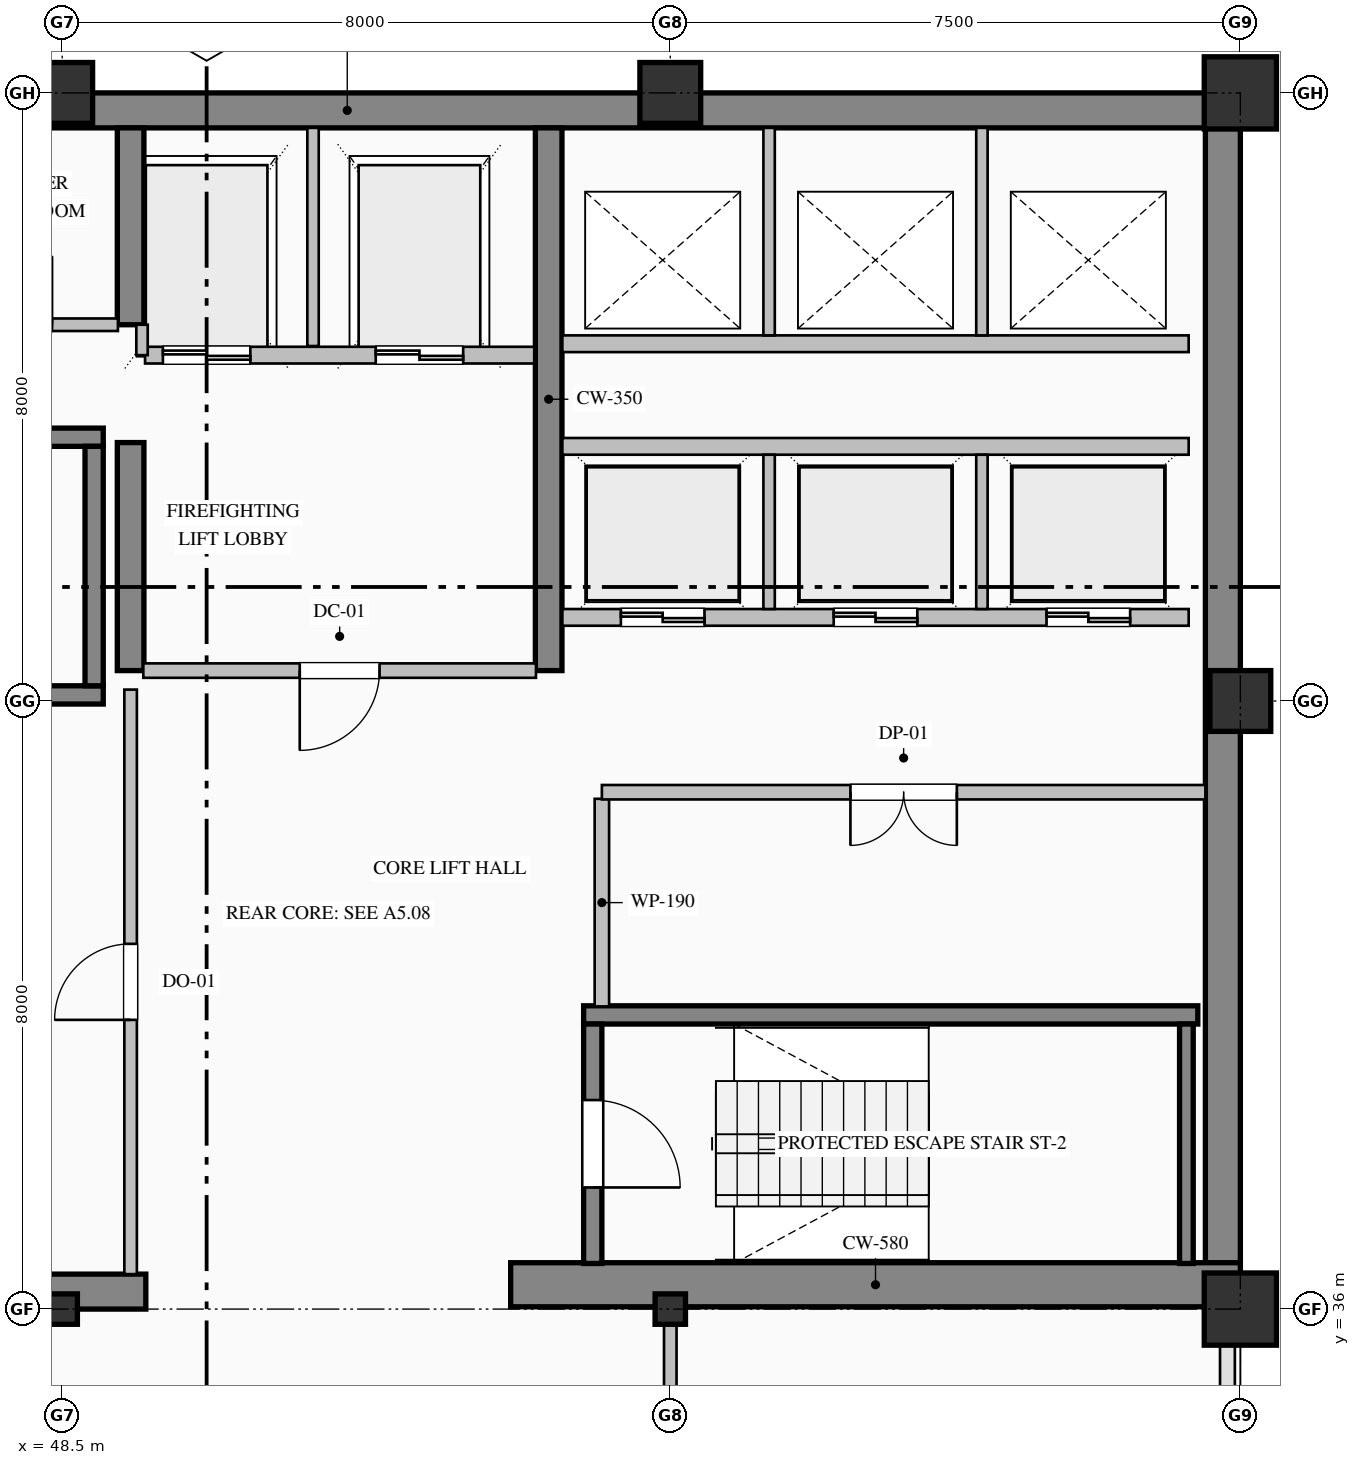
"""IFC4 building model, lengths in metres.
Left out: names, types, materials, properties, quantities, classifications, styles, units other than length and angle.
Written with IfcOpenShell. Run it as: python <this file> out.ifc"""

import sys

from ifc_helpers import new_model, si_unit, direction, frame, frame_2d, origin, origin_2d, place, context, subcontext, project, spatial, rectangle, hollow_rectangle, i_section, extrude, element, fill, save


model = new_model("IFC4")
c1 = context("Model", 3, precision=1e-05, world=origin(), true_north=direction((0.0, 1.0)))
c2 = subcontext(c1, "Body", "Model", "MODEL_VIEW")
j1 = project(units=[si_unit("LENGTHUNIT", "METRE"), si_unit("PLANEANGLEUNIT", "RADIAN")], contexts=[c1])
p1 = place(None, origin())
s1 = spatial("IfcSite", under=j1, at=p1, CompositionType="ELEMENT")
p2 = place(p1, origin())
s2 = spatial("IfcBuilding", under=s1, at=p2, CompositionType="ELEMENT")
p3 = place(p2, frame((0.0, 0.0, 205.8)))
s3 = spatial("IfcBuildingStorey", under=s2, at=p3, CompositionType="ELEMENT", Elevation=205.8)
p4 = place(p3, frame((40.5, 51.77, 0.0), z_axis=(0.0, 0.0, 1.0), x_axis=(1.0, 0.0, 0.0)))
e1 = element("IfcWall", 1, at=p4, inside=s3, PredefinedType="SHEAR", context=c2, shape_type="SweptSolid", body=[
    extrude(rectangle(XDim=23.5, YDim=0.46, at=frame_2d((11.75, 0.0))), origin(), (0.0, 0.0, 1.0), 3.775),
])
p5 = place(p3, frame((63.77, 36.32, 0.0), z_axis=(0.0, 0.0, 1.0), x_axis=(0.0, 1.0, 0.0)))
e2 = element("IfcWall", 2, at=p5, inside=s3, PredefinedType="SHEAR", context=c2, shape_type="SweptSolid", body=[
    extrude(rectangle(XDim=15.22, YDim=0.46, at=frame_2d((7.61, 0.0))), origin(), (0.0, 0.0, 1.0), 3.775),
])
p6 = place(p3, frame((40.5, 36.23, 0.0), z_axis=(0.0, 0.0, 1.0), x_axis=(1.0, 0.0, 0.0)))
e3 = element("IfcWall", 3, at=p6, inside=s3, PredefinedType="SHEAR", context=c2, shape_type="SweptSolid", body=[
    extrude(rectangle(XDim=9.1, YDim=0.46, at=frame_2d((4.55, 0.0))), origin(), (0.0, 0.0, 1.0), 3.775),
])
p7 = place(p3, frame((54.4, 36.32, 0.0), z_axis=(0.0, 0.0, 1.0), x_axis=(1.0, 0.0, 0.0)))
e4 = element("IfcWall", 4, at=p7, inside=s3, PredefinedType="SHEAR", context=c2, shape_type="SweptSolid", body=[
    extrude(rectangle(XDim=9.6, YDim=0.58, at=frame_2d((4.8, 0.0))), origin(), (0.0, 0.0, 1.0), 4.0),
])
p8 = place(p3, frame((49.4, 44.4, 0.0), z_axis=(0.0, 0.0, 1.0), x_axis=(0.0, 1.0, 0.0)))
e5 = element("IfcWall", 5, at=p8, inside=s3, PredefinedType="SHEAR", context=c2, shape_type="SweptSolid", body=[
    extrude(rectangle(XDim=3.0, YDim=0.35, at=frame_2d((1.5, 0.0))), origin(), (0.0, 0.0, 1.0), 3.775),
])
p9 = place(p3, frame((49.4, 48.95, 0.0), z_axis=(0.0, 0.0, 1.0), x_axis=(0.0, 1.0, 0.0)))
e6 = element("IfcWall", 6, at=p9, inside=s3, PredefinedType="SHEAR", context=c2, shape_type="SweptSolid", body=[
    extrude(rectangle(XDim=2.59, YDim=0.35, at=frame_2d((1.295, 0.0))), origin(), (0.0, 0.0, 1.0), 3.775),
])
p10 = place(p3, frame((54.9, 44.4, 0.0), z_axis=(0.0, 0.0, 1.0), x_axis=(0.0, 1.0, 0.0)))
e7 = element("IfcWall", 7, at=p10, inside=s3, PredefinedType="SHEAR", context=c2, shape_type="SweptSolid", body=[
    extrude(rectangle(XDim=7.14, YDim=0.35, at=frame_2d((3.57, 0.0))), origin(), (0.0, 0.0, 1.0), 3.775),
])
p11 = place(p3, frame((48.5, 36.0, 0.0), z_axis=(0.0, 0.0, 1.0), x_axis=(1.0, 0.0, 0.0)))
e8 = element("IfcColumn", 8, at=p11, inside=s3, PredefinedType="COLUMN", context=c2, shape_type="SweptSolid", body=[
    extrude(i_section(OverallWidth=0.4, OverallDepth=0.4, WebThickness=0.013, FlangeThickness=0.021, FilletRadius=0.022, at=origin_2d()), origin(), (0.0, 0.0, 1.0), 4.0),
])
p12 = place(p3, frame((48.5, 52.0, 0.0), z_axis=(0.0, 0.0, 1.0), x_axis=(1.0, 0.0, 0.0)))
e9 = element("IfcColumn", 9, at=p12, inside=s3, PredefinedType="COLUMN", context=c2, shape_type="SweptSolid", body=[
    extrude(hollow_rectangle(XDim=0.8, YDim=0.8, WallThickness=0.032, at=origin_2d()), origin(), (0.0, 0.0, 1.0), 4.0),
])
p13 = place(p3, frame((56.5, 36.0, 0.0), z_axis=(0.0, 0.0, 1.0), x_axis=(1.0, 0.0, 0.0)))
e10 = element("IfcColumn", 10, at=p13, inside=s3, PredefinedType="COLUMN", context=c2, shape_type="SweptSolid", body=[
    extrude(i_section(OverallWidth=0.4, OverallDepth=0.4, WebThickness=0.013, FlangeThickness=0.021, FilletRadius=0.022, at=origin_2d()), origin(), (0.0, 0.0, 1.0), 4.0),
])
p14 = place(p3, frame((56.5, 52.0, 0.0), z_axis=(0.0, 0.0, 1.0), x_axis=(1.0, 0.0, 0.0)))
e11 = element("IfcColumn", 11, at=p14, inside=s3, PredefinedType="COLUMN", context=c2, shape_type="SweptSolid", body=[
    extrude(hollow_rectangle(XDim=0.8, YDim=0.8, WallThickness=0.032, at=origin_2d()), origin(), (0.0, 0.0, 1.0), 4.0),
])
p15 = place(p3, frame((64.0, 36.0, 0.0), z_axis=(0.0, 0.0, 1.0), x_axis=(1.0, 0.0, 0.0)))
e12 = element("IfcColumn", 12, at=p15, inside=s3, PredefinedType="COLUMN", context=c2, shape_type="SweptSolid", body=[
    extrude(hollow_rectangle(XDim=0.95, YDim=0.95, WallThickness=0.036, at=origin_2d()), origin(), (0.0, 0.0, 1.0), 4.0),
])
p16 = place(p3, frame((64.0, 44.0, 0.0), z_axis=(0.0, 0.0, 1.0), x_axis=(1.0, 0.0, 0.0)))
e13 = element("IfcColumn", 13, at=p16, inside=s3, PredefinedType="COLUMN", context=c2, shape_type="SweptSolid", body=[
    extrude(hollow_rectangle(XDim=0.8, YDim=0.8, WallThickness=0.032, at=origin_2d()), origin(), (0.0, 0.0, 1.0), 4.0),
])
p17 = place(p3, frame((64.0, 52.0, 0.0), z_axis=(0.0, 0.0, 1.0), x_axis=(1.0, 0.0, 0.0)))
e14 = element("IfcColumn", 14, at=p17, inside=s3, PredefinedType="COLUMN", context=c2, shape_type="SweptSolid", body=[
    extrude(hollow_rectangle(XDim=0.95, YDim=0.95, WallThickness=0.036, at=origin_2d()), origin(), (0.0, 0.0, 1.0), 4.0),
])
for number, where, z_axis, x_axis in (
    (15, (40.96, 47.47, 0.0), (0.0, 0.0, 1.0), (1.0, 0.0, 0.0)),
    (16, (49.04, 44.08, 0.0), (0.0, 0.0, 1.0), (-1.0, 0.0, 0.0)),
):
    element("IfcWall", number, at=place(p3, frame(where, z_axis=z_axis, x_axis=x_axis)), inside=s3, PredefinedType="SOLIDWALL", context=c2, shape_type="SweptSolid", body=[
        extrude(rectangle(XDim=8.08, YDim=0.24, at=frame_2d((4.04, 0.0))), origin(), (0.0, 0.0, 1.0), 4.0),
    ])
p18 = place(p3, frame((48.92, 44.2, 0.0), z_axis=(0.0, 0.0, 1.0), x_axis=(0.0, 1.0, 0.0)))
e17 = element("IfcWall", 17, at=p18, inside=s3, PredefinedType="SOLIDWALL", context=c2, shape_type="SweptSolid", body=[
    extrude(rectangle(XDim=3.15, YDim=0.24, at=frame_2d((1.575, 0.0))), origin(), (0.0, 0.0, 1.0), 4.0),
])
p19 = place(p3, frame((55.36, 39.87, 0.0), z_axis=(0.0, 0.0, 1.0), x_axis=(1.0, 0.0, 0.0)))
e18 = element("IfcWall", 18, at=p19, inside=s3, PredefinedType="SOLIDWALL", context=c2, shape_type="SweptSolid", body=[
    extrude(rectangle(XDim=8.08, YDim=0.24, at=frame_2d((4.04, 0.0))), origin(), (0.0, 0.0, 1.0), 4.0),
])
p20 = place(p3, frame((55.48, 39.75, 0.0), z_axis=(0.0, 0.0, 1.0), x_axis=(0.0, -1.0, 0.0)))
e19 = element("IfcWall", 19, at=p20, inside=s3, PredefinedType="SOLIDWALL", context=c2, shape_type="SweptSolid", body=[
    extrude(rectangle(XDim=3.15, YDim=0.24, at=frame_2d((1.575, 0.0))), origin(), (0.0, 0.0, 1.0), 4.0),
])
p21 = place(p20, frame((1.0, 0.0, 0.0)))
e20 = element("IfcOpeningElement", 20, at=p21, cuts=e19, PredefinedType="OPENING", context=c2, shape_type="SweptSolid", body=[
    extrude(rectangle(XDim=1.15, YDim=2.2, at=frame_2d((0.575, 1.1))), frame((0.0, 0.13, 0.0), z_axis=(0.0, -1.0, 0.0), x_axis=(1.0, 0.0, 0.0)), (0.0, 0.0, 1.0), 0.26),
])
p22 = place(p3, frame((63.29, 36.6, 0.0), z_axis=(0.0, 0.0, 1.0), x_axis=(0.0, 1.0, 0.0)))
e21 = element("IfcWall", 21, at=p22, inside=s3, PredefinedType="SOLIDWALL", context=c2, shape_type="SweptSolid", body=[
    extrude(rectangle(XDim=3.15, YDim=0.18, at=frame_2d((1.575, 0.0))), origin(), (0.0, 0.0, 1.0), 4.0),
])
p23 = place(p3, frame((54.71, 48.55, 0.0), z_axis=(0.0, 0.0, 1.0), x_axis=(-1.0, 0.0, 0.0)))
e22 = element("IfcWall", 22, at=p23, inside=s3, PredefinedType="PARTITIONING", context=c2, shape_type="SweptSolid", body=[
    extrude(rectangle(XDim=5.12, YDim=0.22, at=frame_2d((2.56, 0.0))), origin(), (0.0, 0.0, 1.0), 3.775),
])
p24 = place(p23, frame((3.735, 0.0, 0.0)))
e23 = element("IfcOpeningElement", 23, at=p24, cuts=e22, PredefinedType="OPENING", context=c2, shape_type="SweptSolid", body=[
    extrude(rectangle(XDim=1.15, YDim=2.2, at=frame_2d((0.575, 1.1))), frame((0.0, 0.12, 0.0), z_axis=(0.0, -1.0, 0.0), x_axis=(1.0, 0.0, 0.0)), (0.0, 0.0, 1.0), 0.24),
])
p25 = place(p23, frame((0.935, 0.0, 0.0)))
e24 = element("IfcOpeningElement", 24, at=p25, cuts=e22, PredefinedType="OPENING", context=c2, shape_type="SweptSolid", body=[
    extrude(rectangle(XDim=1.15, YDim=2.2, at=frame_2d((0.575, 1.1))), frame((0.0, 0.12, 0.0), z_axis=(0.0, -1.0, 0.0), x_axis=(1.0, 0.0, 0.0)), (0.0, 0.0, 1.0), 0.24),
])
p26 = place(p3, frame((51.8, 48.67, 0.0), z_axis=(0.0, 0.0, 1.0), x_axis=(0.0, 1.0, 0.0)))
e25 = element("IfcWall", 25, at=p26, inside=s3, PredefinedType="PARTITIONING", context=c2, shape_type="SweptSolid", body=[
    extrude(rectangle(XDim=2.87, YDim=0.15, at=frame_2d((1.435, 0.0))), origin(), (0.0, 0.0, 1.0), 3.775),
])
p27 = place(p3, frame((49.55, 48.55, 0.0), z_axis=(0.0, 0.0, 1.0), x_axis=(0.0, 1.0, 0.0)))
e26 = element("IfcWall", 26, at=p27, inside=s3, PredefinedType="PARTITIONING", context=c2, shape_type="SweptSolid", body=[
    extrude(rectangle(XDim=0.4, YDim=0.15, at=frame_2d((0.2, 0.0))), origin(), (0.0, 0.0, 1.0), 3.775),
])
p28 = place(p3, frame((63.32, 45.1, 0.0), z_axis=(0.0, 0.0, 1.0), x_axis=(-1.0, 0.0, 0.0)))
e27 = element("IfcWall", 27, at=p28, inside=s3, PredefinedType="PARTITIONING", context=c2, shape_type="SweptSolid", body=[
    extrude(rectangle(XDim=8.24, YDim=0.22, at=frame_2d((4.12, 0.0))), origin(), (0.0, 0.0, 1.0), 3.775),
])
p29 = place(p28, frame((6.37, 0.0, 0.0)))
e28 = element("IfcOpeningElement", 28, at=p29, cuts=e27, PredefinedType="OPENING", context=c2, shape_type="SweptSolid", body=[
    extrude(rectangle(XDim=1.1, YDim=2.2, at=frame_2d((0.55, 1.1))), frame((0.0, 0.12, 0.0), z_axis=(0.0, -1.0, 0.0), x_axis=(1.0, 0.0, 0.0)), (0.0, 0.0, 1.0), 0.24),
])
p30 = place(p28, frame((3.57, 0.0, 0.0)))
e29 = element("IfcOpeningElement", 29, at=p30, cuts=e27, PredefinedType="OPENING", context=c2, shape_type="SweptSolid", body=[
    extrude(rectangle(XDim=1.1, YDim=2.2, at=frame_2d((0.55, 1.1))), frame((0.0, 0.12, 0.0), z_axis=(0.0, -1.0, 0.0), x_axis=(1.0, 0.0, 0.0)), (0.0, 0.0, 1.0), 0.24),
])
p31 = place(p28, frame((0.77, 0.0, 0.0)))
e30 = element("IfcOpeningElement", 30, at=p31, cuts=e27, PredefinedType="OPENING", context=c2, shape_type="SweptSolid", body=[
    extrude(rectangle(XDim=1.1, YDim=2.2, at=frame_2d((0.55, 1.1))), frame((0.0, 0.12, 0.0), z_axis=(0.0, -1.0, 0.0), x_axis=(1.0, 0.0, 0.0)), (0.0, 0.0, 1.0), 0.24),
])
p32 = place(p3, frame((55.08, 47.35, 0.0), z_axis=(0.0, 0.0, 1.0), x_axis=(1.0, 0.0, 0.0)))
e31 = element("IfcWall", 31, at=p32, inside=s3, PredefinedType="PARTITIONING", context=c2, shape_type="SweptSolid", body=[
    extrude(rectangle(XDim=8.24, YDim=0.22, at=frame_2d((4.12, 0.0))), origin(), (0.0, 0.0, 1.0), 3.775),
])
for number, where, z_axis, x_axis in (
    (32, (57.8, 45.21, 0.0), (0.0, 0.0, 1.0), (0.0, 1.0, 0.0)),
    (33, (60.6, 45.21, 0.0), (0.0, 0.0, 1.0), (0.0, 1.0, 0.0)),
):
    element("IfcWall", number, at=place(p3, frame(where, z_axis=z_axis, x_axis=x_axis)), inside=s3, PredefinedType="PARTITIONING", context=c2, shape_type="SweptSolid", body=[
        extrude(rectangle(XDim=2.03, YDim=0.15, at=frame_2d((1.015, 0.0))), origin(), (0.0, 0.0, 1.0), 3.775),
    ])
p33 = place(p3, frame((63.32, 48.7, 0.0), z_axis=(0.0, 0.0, 1.0), x_axis=(-1.0, 0.0, 0.0)))
e34 = element("IfcWall", 34, at=p33, inside=s3, PredefinedType="PARTITIONING", context=c2, shape_type="SweptSolid", body=[
    extrude(rectangle(XDim=8.24, YDim=0.22, at=frame_2d((4.12, 0.0))), origin(), (0.0, 0.0, 1.0), 3.775),
])
for number, where, z_axis, x_axis in (
    (35, (57.8, 48.81, 0.0), (0.0, 0.0, 1.0), (0.0, 1.0, 0.0)),
    (36, (60.6, 48.81, 0.0), (0.0, 0.0, 1.0), (0.0, 1.0, 0.0)),
):
    element("IfcWall", number, at=place(p3, frame(where, z_axis=z_axis, x_axis=x_axis)), inside=s3, PredefinedType="PARTITIONING", context=c2, shape_type="SweptSolid", body=[
        extrude(rectangle(XDim=2.73, YDim=0.15, at=frame_2d((1.365, 0.0))), origin(), (0.0, 0.0, 1.0), 3.775),
    ])
p34 = place(p3, frame((46.6, 48.95, 0.0), z_axis=(0.0, 0.0, 1.0), x_axis=(1.0, 0.0, 0.0)))
e37 = element("IfcWall", 37, at=p34, inside=s3, PredefinedType="PARTITIONING", context=c2, shape_type="SweptSolid", body=[
    extrude(rectangle(XDim=2.633, YDim=0.165, at=frame_2d((1.316, 0.0))), origin(), (0.0, 0.0, 1.0), 3.775),
])
p35 = place(p34, frame((0.866, 0.0, 0.0)))
e38 = element("IfcOpeningElement", 38, at=p35, cuts=e37, PredefinedType="OPENING", context=c2, shape_type="SweptSolid", body=[
    extrude(rectangle(XDim=0.9, YDim=2.15, at=frame_2d((0.45, 1.075))), frame((0.0, 0.093, 0.0), z_axis=(0.0, -1.0, 0.0), x_axis=(1.0, 0.0, 0.0)), (0.0, 0.0, 1.0), 0.185),
])
p36 = place(p3, frame((54.733, 44.4, 0.0), z_axis=(0.0, 0.0, 1.0), x_axis=(-1.0, 0.0, 0.0)))
e39 = element("IfcWall", 39, at=p36, inside=s3, PredefinedType="PARTITIONING", context=c2, shape_type="SweptSolid", body=[
    extrude(rectangle(XDim=5.166, YDim=0.19, at=frame_2d((2.583, 0.0))), origin(), (0.0, 0.0, 1.0), 3.775),
])
p37 = place(p36, frame((2.058, 0.0, 0.0)))
e40 = element("IfcOpeningElement", 40, at=p37, cuts=e39, PredefinedType="OPENING", context=c2, shape_type="SweptSolid", body=[
    extrude(rectangle(XDim=1.05, YDim=2.15, at=frame_2d((0.525, 1.075))), frame((0.0, 0.105, 0.0), z_axis=(0.0, -1.0, 0.0), x_axis=(1.0, 0.0, 0.0)), (0.0, 0.0, 1.0), 0.21),
])
p38 = place(p3, frame((49.4, 36.46, 0.0), z_axis=(0.0, 0.0, 1.0), x_axis=(0.0, 1.0, 0.0)))
e41 = element("IfcWall", 41, at=p38, inside=s3, PredefinedType="PARTITIONING", context=c2, shape_type="SweptSolid", body=[
    extrude(rectangle(XDim=7.69, YDim=0.165, at=frame_2d((3.845, 0.0))), origin(), (0.0, 0.0, 1.0), 3.017),
])
p39 = place(p38, frame((3.345, 0.0, 0.0)))
e42 = element("IfcOpeningElement", 42, at=p39, cuts=e41, PredefinedType="OPENING", context=c2, shape_type="SweptSolid", body=[
    extrude(rectangle(XDim=1.0, YDim=2.15, at=frame_2d((0.5, 1.075))), frame((0.0, 0.093, 0.0), z_axis=(0.0, -1.0, 0.0), x_axis=(1.0, 0.0, 0.0)), (0.0, 0.0, 1.0), 0.185),
])
p40 = place(p3, frame((55.6, 42.713, 0.0), z_axis=(0.0, 0.0, 1.0), x_axis=(0.0, -1.0, 0.0)))
e43 = element("IfcWall", 43, at=p40, inside=s3, PredefinedType="PARTITIONING", context=c2, shape_type="SweptSolid", body=[
    extrude(rectangle(XDim=2.731, YDim=0.19, at=frame_2d((1.365, 0.0))), origin(), (0.0, 0.0, 1.0), 3.775),
])
p41 = place(p3, frame((63.54, 42.8, 0.0), z_axis=(0.0, 0.0, 1.0), x_axis=(-1.0, 0.0, 0.0)))
e44 = element("IfcWall", 44, at=p41, inside=s3, PredefinedType="PARTITIONING", context=c2, shape_type="SweptSolid", body=[
    extrude(rectangle(XDim=7.94, YDim=0.19, at=frame_2d((3.97, 0.0))), origin(), (0.0, 0.0, 1.0), 3.775),
])
p42 = place(p41, frame((3.27, 0.0, 0.0)))
e45 = element("IfcOpeningElement", 45, at=p42, cuts=e44, PredefinedType="OPENING", context=c2, shape_type="SweptSolid", body=[
    extrude(rectangle(XDim=1.4, YDim=2.25, at=frame_2d((0.7, 1.125))), frame((0.0, 0.105, 0.0), z_axis=(0.0, -1.0, 0.0), x_axis=(1.0, 0.0, 0.0)), (0.0, 0.0, 1.0), 0.21),
])
p43 = place(p3, frame((56.5, 36.0, 0.0), z_axis=(0.0, 0.0, 1.0), x_axis=(0.0, -1.0, 0.0)))
e46 = element("IfcWall", 46, at=p43, inside=s3, PredefinedType="PARTITIONING", context=c2, shape_type="SweptSolid", body=[
    extrude(rectangle(XDim=4.153, YDim=0.165, at=frame_2d((2.077, 0.0))), origin(), (0.0, 0.0, 1.0), 3.179),
])
p44 = place(p43, frame((1.576, 0.0, 0.0)))
e47 = element("IfcOpeningElement", 47, at=p44, cuts=e46, PredefinedType="OPENING", context=c2, shape_type="SweptSolid", body=[
    extrude(rectangle(XDim=1.0, YDim=2.15, at=frame_2d((0.5, 1.075))), frame((0.0, 0.093, 0.0), z_axis=(0.0, -1.0, 0.0), x_axis=(1.0, 0.0, 0.0)), (0.0, 0.0, 1.0), 0.185),
])
p45 = place(p21, origin())
e48 = element("IfcDoor", 48, at=p45, inside=s3, OperationType="SINGLE_SWING_RIGHT", PredefinedType="DOOR", context=c2, shape_type="SweptSolid", body=[
    extrude(rectangle(XDim=1.15, YDim=2.2, at=frame_2d((0.575, 1.1))), frame((0.0, 0.025, 0.0), z_axis=(0.0, -1.0, 0.0), x_axis=(1.0, 0.0, 0.0)), (0.0, 0.0, 1.0), 0.05),
])
fill(e20, e48)
p46 = place(p24, origin())
e49 = element("IfcDoor", 49, at=p46, inside=s3, OperationType="DOUBLE_DOOR_SLIDING", PredefinedType="DOOR", context=c2, shape_type="SweptSolid", body=[
    extrude(rectangle(XDim=1.15, YDim=2.2, at=frame_2d((0.575, 1.1))), frame((0.0, 0.025, 0.0), z_axis=(0.0, -1.0, 0.0), x_axis=(1.0, 0.0, 0.0)), (0.0, 0.0, 1.0), 0.05),
])
fill(e23, e49)
p47 = place(p25, origin())
e50 = element("IfcDoor", 50, at=p47, inside=s3, OperationType="DOUBLE_DOOR_SLIDING", PredefinedType="DOOR", context=c2, shape_type="SweptSolid", body=[
    extrude(rectangle(XDim=1.15, YDim=2.2, at=frame_2d((0.575, 1.1))), frame((0.0, 0.025, 0.0), z_axis=(0.0, -1.0, 0.0), x_axis=(1.0, 0.0, 0.0)), (0.0, 0.0, 1.0), 0.05),
])
fill(e24, e50)
p48 = place(p29, origin())
e51 = element("IfcDoor", 51, at=p48, inside=s3, OperationType="DOUBLE_DOOR_SLIDING", PredefinedType="DOOR", context=c2, shape_type="SweptSolid", body=[
    extrude(rectangle(XDim=1.1, YDim=2.2, at=frame_2d((0.55, 1.1))), frame((0.0, 0.025, 0.0), z_axis=(0.0, -1.0, 0.0), x_axis=(1.0, 0.0, 0.0)), (0.0, 0.0, 1.0), 0.05),
])
fill(e28, e51)
p49 = place(p30, origin())
e52 = element("IfcDoor", 52, at=p49, inside=s3, OperationType="DOUBLE_DOOR_SLIDING", PredefinedType="DOOR", context=c2, shape_type="SweptSolid", body=[
    extrude(rectangle(XDim=1.1, YDim=2.2, at=frame_2d((0.55, 1.1))), frame((0.0, 0.025, 0.0), z_axis=(0.0, -1.0, 0.0), x_axis=(1.0, 0.0, 0.0)), (0.0, 0.0, 1.0), 0.05),
])
fill(e29, e52)
p50 = place(p31, origin())
e53 = element("IfcDoor", 53, at=p50, inside=s3, OperationType="DOUBLE_DOOR_SLIDING", PredefinedType="DOOR", context=c2, shape_type="SweptSolid", body=[
    extrude(rectangle(XDim=1.1, YDim=2.2, at=frame_2d((0.55, 1.1))), frame((0.0, 0.025, 0.0), z_axis=(0.0, -1.0, 0.0), x_axis=(1.0, 0.0, 0.0)), (0.0, 0.0, 1.0), 0.05),
])
fill(e30, e53)
p51 = place(p37, origin())
e54 = element("IfcDoor", 54, at=p51, inside=s3, OperationType="SINGLE_SWING_RIGHT", PredefinedType="DOOR", context=c2, shape_type="SweptSolid", body=[
    extrude(rectangle(XDim=1.05, YDim=2.15, at=frame_2d((0.525, 1.075))), frame((0.0, 0.025, 0.0), z_axis=(0.0, -1.0, 0.0), x_axis=(1.0, 0.0, 0.0)), (0.0, 0.0, 1.0), 0.05),
])
fill(e40, e54)
p52 = place(p39, origin())
e55 = element("IfcDoor", 55, at=p52, inside=s3, OperationType="SINGLE_SWING_LEFT", PredefinedType="DOOR", context=c2, shape_type="SweptSolid", body=[
    extrude(rectangle(XDim=1.0, YDim=2.15, at=frame_2d((0.5, 1.075))), frame((0.0, 0.025, 0.0), z_axis=(0.0, -1.0, 0.0), x_axis=(1.0, 0.0, 0.0)), (0.0, 0.0, 1.0), 0.05),
])
fill(e42, e55)
p53 = place(p42, origin())
e56 = element("IfcDoor", 56, at=p53, inside=s3, OperationType="DOUBLE_DOOR_SINGLE_SWING", PredefinedType="DOOR", context=c2, shape_type="SweptSolid", body=[
    extrude(rectangle(XDim=1.4, YDim=2.25, at=frame_2d((0.7, 1.125))), frame((0.0, 0.025, 0.0), z_axis=(0.0, -1.0, 0.0), x_axis=(1.0, 0.0, 0.0)), (0.0, 0.0, 1.0), 0.05),
])
fill(e45, e56)
save(model, sys.argv[1])
